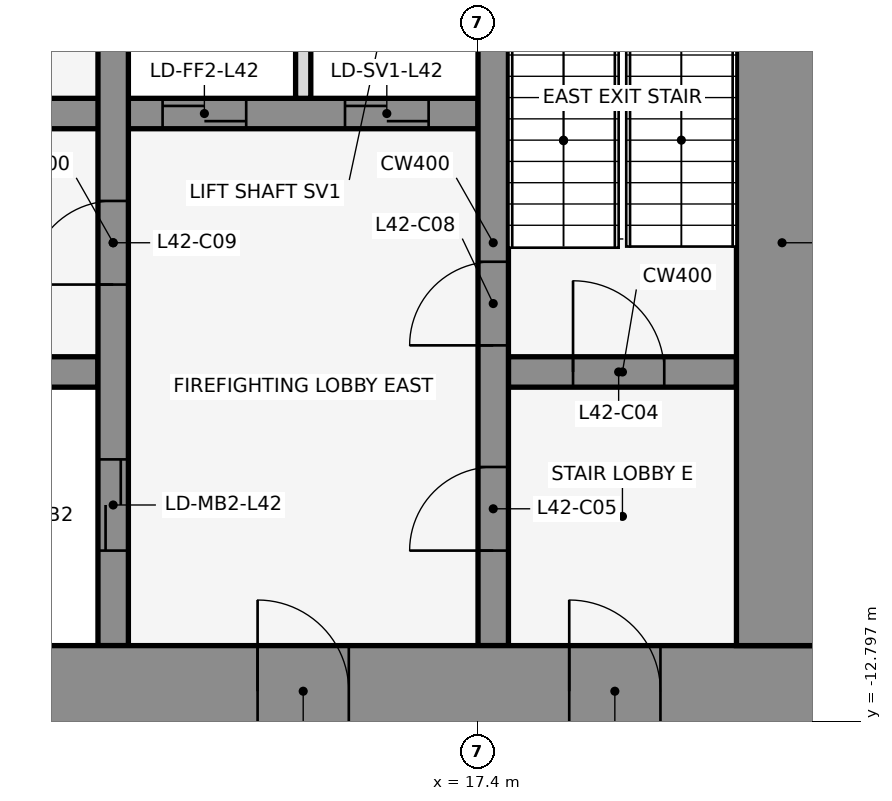
"""IFC4 building model, lengths in metres.
Left out: names, types, materials, properties, quantities, classifications, styles, units other than length and angle.
Written with IfcOpenShell. Run it as: python <this file> out.ifc"""

import sys

from ifc_helpers import new_model, si_unit, direction, frame, frame_2d, origin, place, context, subcontext, project, spatial, rectangle, extrude, element, fill, save


model = new_model("IFC4")
c1 = context("Model", 3, precision=1e-05, world=origin(), true_north=direction((0.0, 1.0)))
c2 = subcontext(c1, "Body", "Model", "MODEL_VIEW")
j1 = project(units=[si_unit("LENGTHUNIT", "METRE"), si_unit("PLANEANGLEUNIT", "RADIAN")], contexts=[c1])
p1 = place(None, origin())
s1 = spatial("IfcSite", under=j1, at=p1, CompositionType="ELEMENT")
p2 = place(p1, origin())
s2 = spatial("IfcBuilding", under=s1, at=p2, CompositionType="ELEMENT")
p3 = place(p2, frame((0.0, 0.0, 190.9)))
s3 = spatial("IfcBuildingStorey", under=s2, at=p3, CompositionType="ELEMENT", Elevation=190.9)
p4 = place(p3, frame((6.4, -8.2, 0.0), z_axis=(0.0, 0.0, 1.0), x_axis=(1.0, 0.0, 0.0)))
e1 = element("IfcWall", 1, at=p4, inside=s3, PredefinedType="SHEAR", context=c2, shape_type="SweptSolid", body=[
    extrude(rectangle(XDim=6.0, YDim=0.4, at=frame_2d((3.0, 0.0))), origin(), (0.0, 0.0, 1.0), 4.1),
])
p5 = place(p3, frame((17.8, -8.2, 0.0), z_axis=(0.0, 0.0, 1.0), x_axis=(1.0, 0.0, 0.0)))
e2 = element("IfcWall", 2, at=p5, inside=s3, PredefinedType="SHEAR", context=c2, shape_type="SweptSolid", body=[
    extrude(rectangle(XDim=3.0, YDim=0.4, at=frame_2d((1.5, 0.0))), origin(), (0.0, 0.0, 1.0), 4.1),
])
p6 = place(p5, frame((0.85, 0.0, 0.0)))
e3 = element("IfcOpeningElement", 3, at=p6, cuts=e2, PredefinedType="OPENING", context=c2, shape_type="SweptSolid", body=[
    extrude(rectangle(XDim=1.2, YDim=2.1, at=frame_2d((0.6, 1.05))), frame((0.0, 0.212, 0.0), z_axis=(0.0, -1.0, 0.0), x_axis=(1.0, 0.0, 0.0)), (0.0, 0.0, 1.0), 0.424),
])
p7 = place(p3, frame((3.8, -4.8, 0.0), z_axis=(0.0, 0.0, 1.0), x_axis=(1.0, 0.0, 0.0)))
e4 = element("IfcWall", 4, at=p7, inside=s3, PredefinedType="SHEAR", context=c2, shape_type="SweptSolid", body=[
    extrude(rectangle(XDim=13.6, YDim=0.4, at=frame_2d((6.8, 0.0))), origin(), (0.0, 0.0, 1.0), 4.1),
])
p8 = place(p7, frame((9.45, 0.0, 0.0)))
e5 = element("IfcOpeningElement", 5, at=p8, cuts=e4, PredefinedType="OPENING", context=c2, shape_type="SweptSolid", body=[
    extrude(rectangle(XDim=1.1, YDim=2.1, at=frame_2d((0.55, 1.05))), frame((0.0, 0.212, 0.0), z_axis=(0.0, -1.0, 0.0), x_axis=(1.0, 0.0, 0.0)), (0.0, 0.0, 1.0), 0.424),
])
p9 = place(p7, frame((11.85, 0.0, 0.0)))
e6 = element("IfcOpeningElement", 6, at=p9, cuts=e4, PredefinedType="OPENING", context=c2, shape_type="SweptSolid", body=[
    extrude(rectangle(XDim=1.1, YDim=2.1, at=frame_2d((0.55, 1.05))), frame((0.0, 0.212, 0.0), z_axis=(0.0, -1.0, 0.0), x_axis=(1.0, 0.0, 0.0)), (0.0, 0.0, 1.0), 0.424),
])
p10 = place(p7, frame((0.95, 0.0, 0.0)))
e7 = element("IfcOpeningElement", 7, at=p10, cuts=e4, PredefinedType="OPENING", context=c2, shape_type="SweptSolid", body=[
    extrude(rectangle(XDim=0.9, YDim=2.1, at=frame_2d((0.45, 1.05))), frame((0.0, 0.212, 0.0), z_axis=(0.0, -1.0, 0.0), x_axis=(1.0, 0.0, 0.0)), (0.0, 0.0, 1.0), 0.424),
])
p11 = place(p7, frame((5.35, 0.0, 0.0)))
e8 = element("IfcOpeningElement", 8, at=p11, cuts=e4, PredefinedType="OPENING", context=c2, shape_type="SweptSolid", body=[
    extrude(rectangle(XDim=0.9, YDim=2.1, at=frame_2d((0.45, 1.05))), frame((0.0, 0.212, 0.0), z_axis=(0.0, -1.0, 0.0), x_axis=(1.0, 0.0, 0.0)), (0.0, 0.0, 1.0), 0.424),
])
p12 = place(p3, frame((12.6, -11.8, 0.0), z_axis=(0.0, 0.0, 1.0), x_axis=(0.0, 1.0, 0.0)))
e9 = element("IfcWall", 9, at=p12, inside=s3, PredefinedType="SHEAR", context=c2, shape_type="SweptSolid", body=[
    extrude(rectangle(XDim=10.6, YDim=0.4, at=frame_2d((5.3, 0.0))), origin(), (0.0, 0.0, 1.0), 4.1),
])
p13 = place(p12, frame((1.25, 0.0, 0.0)))
e10 = element("IfcOpeningElement", 10, at=p13, cuts=e9, PredefinedType="OPENING", context=c2, shape_type="SweptSolid", body=[
    extrude(rectangle(XDim=1.2, YDim=2.1, at=frame_2d((0.6, 1.05))), frame((0.0, 0.212, 0.0), z_axis=(0.0, -1.0, 0.0), x_axis=(1.0, 0.0, 0.0)), (0.0, 0.0, 1.0), 0.424),
])
p14 = place(p12, frame((4.75, 0.0, 0.0)))
e11 = element("IfcOpeningElement", 11, at=p14, cuts=e9, PredefinedType="OPENING", context=c2, shape_type="SweptSolid", body=[
    extrude(rectangle(XDim=1.1, YDim=2.1, at=frame_2d((0.55, 1.05))), frame((0.0, 0.212, 0.0), z_axis=(0.0, -1.0, 0.0), x_axis=(1.0, 0.0, 0.0)), (0.0, 0.0, 1.0), 0.424),
])
p15 = place(p3, frame((15.1, -4.6, 0.0), z_axis=(0.0, 0.0, 1.0), x_axis=(0.0, 1.0, 0.0)))
e12 = element("IfcWall", 12, at=p15, inside=s3, PredefinedType="PARTITIONING", context=c2, shape_type="SweptSolid", body=[
    extrude(rectangle(XDim=3.4, YDim=0.2, at=frame_2d((1.7, 0.0))), origin(), (0.0, 0.0, 1.0), 2.96),
])
p16 = place(p3, frame((17.6, -11.8, 0.0), z_axis=(0.0, 0.0, 1.0), x_axis=(0.0, 1.0, 0.0)))
e13 = element("IfcWall", 13, at=p16, inside=s3, PredefinedType="SHEAR", context=c2, shape_type="SweptSolid", body=[
    extrude(rectangle(XDim=10.6, YDim=0.4, at=frame_2d((5.3, 0.0))), origin(), (0.0, 0.0, 1.0), 4.1),
])
p17 = place(p16, frame((1.25, 0.0, 0.0)))
e14 = element("IfcOpeningElement", 14, at=p17, cuts=e13, PredefinedType="OPENING", context=c2, shape_type="SweptSolid", body=[
    extrude(rectangle(XDim=1.1, YDim=2.1, at=frame_2d((0.55, 1.05))), frame((0.0, 0.212, 0.0), z_axis=(0.0, -1.0, 0.0), x_axis=(1.0, 0.0, 0.0)), (0.0, 0.0, 1.0), 0.424),
])
p18 = place(p16, frame((3.95, 0.0, 0.0)))
e15 = element("IfcOpeningElement", 15, at=p18, cuts=e13, PredefinedType="OPENING", context=c2, shape_type="SweptSolid", body=[
    extrude(rectangle(XDim=1.1, YDim=2.1, at=frame_2d((0.55, 1.05))), frame((0.0, 0.212, 0.0), z_axis=(0.0, -1.0, 0.0), x_axis=(1.0, 0.0, 0.0)), (0.0, 0.0, 1.0), 0.424),
])
p19 = place(p3, frame((-22.0, -12.4, 0.0), z_axis=(0.0, 0.0, 1.0), x_axis=(1.0, 0.0, 0.0)))
e16 = element("IfcWall", 16, at=p19, inside=s3, PredefinedType="SHEAR", context=c2, shape_type="SweptSolid", body=[
    extrude(rectangle(XDim=44.0, YDim=1.2, at=frame_2d((22.0, 0.0))), origin(), (0.0, 0.0, 1.0), 4.1),
])
p20 = place(p19, frame((2.2, 0.0, 0.0)))
e17 = element("IfcOpeningElement", 17, at=p20, cuts=e16, PredefinedType="OPENING", context=c2, shape_type="SweptSolid", body=[
    extrude(rectangle(XDim=1.2, YDim=2.1, at=frame_2d((0.6, 1.05))), frame((0.0, 0.612, 0.0), z_axis=(0.0, -1.0, 0.0), x_axis=(1.0, 0.0, 0.0)), (0.0, 0.0, 1.0), 1.224),
])
p21 = place(p19, frame((21.4, 0.0, 0.0)))
e18 = element("IfcOpeningElement", 18, at=p21, cuts=e16, PredefinedType="OPENING", context=c2, shape_type="SweptSolid", body=[
    extrude(rectangle(XDim=1.2, YDim=2.1, at=frame_2d((0.6, 1.05))), frame((0.0, 0.612, 0.0), z_axis=(0.0, -1.0, 0.0), x_axis=(1.0, 0.0, 0.0)), (0.0, 0.0, 1.0), 1.224),
])
p22 = place(p19, frame((40.6, 0.0, 0.0)))
e19 = element("IfcOpeningElement", 19, at=p22, cuts=e16, PredefinedType="OPENING", context=c2, shape_type="SweptSolid", body=[
    extrude(rectangle(XDim=1.2, YDim=2.1, at=frame_2d((0.6, 1.05))), frame((0.0, 0.612, 0.0), z_axis=(0.0, -1.0, 0.0), x_axis=(1.0, 0.0, 0.0)), (0.0, 0.0, 1.0), 1.224),
])
p23 = place(p19, frame((16.0, 0.0, 0.0)))
e20 = element("IfcOpeningElement", 20, at=p23, cuts=e16, PredefinedType="OPENING", context=c2, shape_type="SweptSolid", body=[
    extrude(rectangle(XDim=1.8, YDim=2.1, at=frame_2d((0.9, 1.05))), frame((0.0, 0.612, 0.0), z_axis=(0.0, -1.0, 0.0), x_axis=(1.0, 0.0, 0.0)), (0.0, 0.0, 1.0), 1.224),
])
p24 = place(p19, frame((6.3, 0.0, 0.0)))
e21 = element("IfcOpeningElement", 21, at=p24, cuts=e16, PredefinedType="OPENING", context=c2, shape_type="SweptSolid", body=[
    extrude(rectangle(XDim=1.2, YDim=2.1, at=frame_2d((0.6, 1.05))), frame((0.0, 0.612, 0.0), z_axis=(0.0, -1.0, 0.0), x_axis=(1.0, 0.0, 0.0)), (0.0, 0.0, 1.0), 1.224),
])
p25 = place(p19, frame((26.2, 0.0, 0.0)))
e22 = element("IfcOpeningElement", 22, at=p25, cuts=e16, PredefinedType="OPENING", context=c2, shape_type="SweptSolid", body=[
    extrude(rectangle(XDim=1.8, YDim=2.1, at=frame_2d((0.9, 1.05))), frame((0.0, 0.612, 0.0), z_axis=(0.0, -1.0, 0.0), x_axis=(1.0, 0.0, 0.0)), (0.0, 0.0, 1.0), 1.224),
])
p26 = place(p19, frame((36.5, 0.0, 0.0)))
e23 = element("IfcOpeningElement", 23, at=p26, cuts=e16, PredefinedType="OPENING", context=c2, shape_type="SweptSolid", body=[
    extrude(rectangle(XDim=1.2, YDim=2.1, at=frame_2d((0.6, 1.05))), frame((0.0, 0.612, 0.0), z_axis=(0.0, -1.0, 0.0), x_axis=(1.0, 0.0, 0.0)), (0.0, 0.0, 1.0), 1.224),
])
p27 = place(p3, frame((21.4, -11.8, 0.0), z_axis=(0.0, 0.0, 1.0), x_axis=(0.0, 1.0, 0.0)))
e24 = element("IfcWall", 24, at=p27, inside=s3, PredefinedType="SHEAR", context=c2, shape_type="SweptSolid", body=[
    extrude(rectangle(XDim=10.6, YDim=1.2, at=frame_2d((5.3, 0.0))), origin(), (0.0, 0.0, 1.0), 4.1),
])
p28 = place(p6, origin())
e25 = element("IfcDoor", 25, at=p28, inside=s3, OperationType="SINGLE_SWING_RIGHT", PredefinedType="DOOR", context=c2, shape_type="SweptSolid", body=[
    extrude(rectangle(XDim=1.2, YDim=2.1, at=frame_2d((0.6, 1.05))), frame((0.0, 0.025, 0.0), z_axis=(0.0, -1.0, 0.0), x_axis=(1.0, 0.0, 0.0)), (0.0, 0.0, 1.0), 0.05),
])
fill(e3, e25)
p29 = place(p17, origin())
e26 = element("IfcDoor", 26, at=p29, inside=s3, OperationType="SINGLE_SWING_LEFT", PredefinedType="DOOR", context=c2, shape_type="SweptSolid", body=[
    extrude(rectangle(XDim=1.1, YDim=2.1, at=frame_2d((0.55, 1.05))), frame((0.0, 0.025, 0.0), z_axis=(0.0, -1.0, 0.0), x_axis=(1.0, 0.0, 0.0)), (0.0, 0.0, 1.0), 0.05),
])
fill(e14, e26)
p30 = place(p13, origin())
e27 = element("IfcDoor", 27, at=p30, inside=s3, OperationType="DOUBLE_DOOR_SLIDING", PredefinedType="DOOR", context=c2, shape_type="SweptSolid", body=[
    extrude(rectangle(XDim=1.2, YDim=2.1, at=frame_2d((0.6, 1.05))), frame((0.0, 0.025, 0.0), z_axis=(0.0, -1.0, 0.0), x_axis=(1.0, 0.0, 0.0)), (0.0, 0.0, 1.0), 0.05),
])
fill(e10, e27)
p31 = place(p8, origin())
e28 = element("IfcDoor", 28, at=p31, inside=s3, OperationType="DOUBLE_DOOR_SLIDING", PredefinedType="DOOR", context=c2, shape_type="SweptSolid", body=[
    extrude(rectangle(XDim=1.1, YDim=2.1, at=frame_2d((0.55, 1.05))), frame((0.0, 0.025, 0.0), z_axis=(0.0, -1.0, 0.0), x_axis=(1.0, 0.0, 0.0)), (0.0, 0.0, 1.0), 0.05),
])
fill(e5, e28)
p32 = place(p9, origin())
e29 = element("IfcDoor", 29, at=p32, inside=s3, OperationType="DOUBLE_DOOR_SLIDING", PredefinedType="DOOR", context=c2, shape_type="SweptSolid", body=[
    extrude(rectangle(XDim=1.1, YDim=2.1, at=frame_2d((0.55, 1.05))), frame((0.0, 0.025, 0.0), z_axis=(0.0, -1.0, 0.0), x_axis=(1.0, 0.0, 0.0)), (0.0, 0.0, 1.0), 0.05),
])
fill(e6, e29)
p33 = place(p18, origin())
e30 = element("IfcDoor", 30, at=p33, inside=s3, OperationType="SINGLE_SWING_RIGHT", PredefinedType="DOOR", context=c2, shape_type="SweptSolid", body=[
    extrude(rectangle(XDim=1.1, YDim=2.1, at=frame_2d((0.55, 1.05))), frame((0.0, 0.025, 0.0), z_axis=(0.0, -1.0, 0.0), x_axis=(1.0, 0.0, 0.0)), (0.0, 0.0, 1.0), 0.05),
])
fill(e15, e30)
p34 = place(p14, frame((1.1, 0.0, 0.0), z_axis=(0.0, 0.0, 1.0), x_axis=(-1.0, 0.0, 0.0)))
e31 = element("IfcDoor", 31, at=p34, inside=s3, OperationType="SINGLE_SWING_RIGHT", PredefinedType="DOOR", context=c2, shape_type="SweptSolid", body=[
    extrude(rectangle(XDim=1.1, YDim=2.1, at=frame_2d((0.55, 1.05))), frame((0.0, 0.025, 0.0), z_axis=(0.0, -1.0, 0.0), x_axis=(1.0, 0.0, 0.0)), (0.0, 0.0, 1.0), 0.05),
])
fill(e11, e31)
p35 = place(p22, frame((1.2, 0.0, 0.0), z_axis=(0.0, 0.0, 1.0), x_axis=(-1.0, 0.0, 0.0)))
e32 = element("IfcDoor", 32, at=p35, inside=s3, OperationType="SINGLE_SWING_RIGHT", PredefinedType="DOOR", context=c2, shape_type="SweptSolid", body=[
    extrude(rectangle(XDim=1.2, YDim=2.1, at=frame_2d((0.6, 1.05))), frame((0.0, 0.025, 0.0), z_axis=(0.0, -1.0, 0.0), x_axis=(1.0, 0.0, 0.0)), (0.0, 0.0, 1.0), 0.05),
])
fill(e19, e32)
p36 = place(p26, frame((1.2, 0.0, 0.0), z_axis=(0.0, 0.0, 1.0), x_axis=(-1.0, 0.0, 0.0)))
e33 = element("IfcDoor", 33, at=p36, inside=s3, OperationType="SINGLE_SWING_RIGHT", PredefinedType="DOOR", context=c2, shape_type="SweptSolid", body=[
    extrude(rectangle(XDim=1.2, YDim=2.1, at=frame_2d((0.6, 1.05))), frame((0.0, 0.025, 0.0), z_axis=(0.0, -1.0, 0.0), x_axis=(1.0, 0.0, 0.0)), (0.0, 0.0, 1.0), 0.05),
])
fill(e23, e33)
save(model, sys.argv[1])
